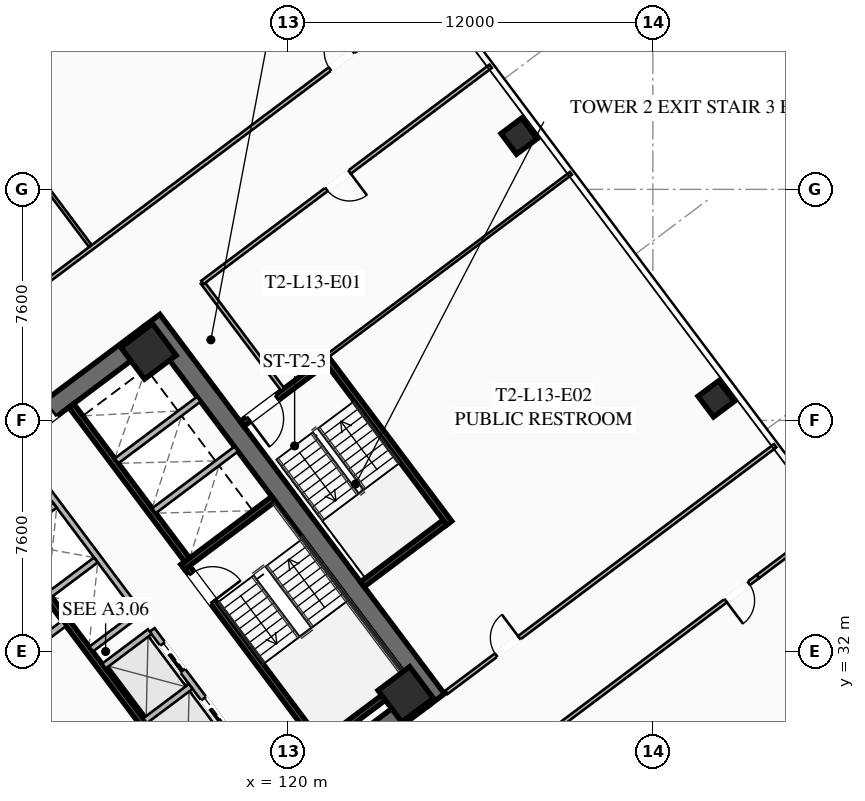
"""IFC4 building model, lengths in metres.
Left out: names, types, materials, properties, quantities, classifications, styles, units other than length and angle.
Written with IfcOpenShell. Run it as: python <this file> out.ifc"""

import sys

from ifc_helpers import new_model, si_unit, direction, frame, frame_2d, origin, origin_2d, place, context, subcontext, project, spatial, rectangle, hollow_rectangle, extrude, element, fill, save


model = new_model("IFC4")
c1 = context("Model", 3, precision=1e-05, world=origin(), true_north=direction((0.0, 1.0)))
c2 = subcontext(c1, "Body", "Model", "MODEL_VIEW")
j1 = project(units=[si_unit("LENGTHUNIT", "METRE"), si_unit("PLANEANGLEUNIT", "RADIAN")], contexts=[c1])
p1 = place(None, origin())
s1 = spatial("IfcSite", under=j1, at=p1, CompositionType="ELEMENT")
p2 = place(p1, origin())
s2 = spatial("IfcBuilding", under=s1, at=p2, CompositionType="ELEMENT")
p3 = place(p2, frame((0.0, 0.0, 53.0)))
s3 = spatial("IfcBuildingStorey", under=s2, at=p3, CompositionType="ELEMENT", Elevation=53.0)
for number, where, z_axis, x_axis in (
    (1, (112.476, 21.107, 0.0), (0.0, 0.0, 1.0), (-0.6, 0.8, 0.0)),
    (2, (115.524, 42.893, 0.0), (0.0, 0.0, 1.0), (0.6, -0.8, 0.0)),
):
    element("IfcWall", number, at=place(p3, frame(where, z_axis=z_axis, x_axis=x_axis)), inside=s3, PredefinedType="SHEAR", context=c2, shape_type="SweptSolid", body=[
        extrude(rectangle(XDim=15.6, YDim=0.65, at=frame_2d((7.8, 0.0))), origin(), (0.0, 0.0, 1.0), 3.55),
    ])
p4 = place(p3, frame((124.429, 30.478, 0.0), z_axis=(0.0, 0.0, 1.0), x_axis=(-0.799998028465, -0.600002628705, 0.0)))
e3 = element("IfcWall", 3, at=p4, inside=s3, PredefinedType="SHEAR", context=c2, shape_type="SweptSolid", body=[
    extrude(rectangle(XDim=14.86, YDim=0.65, at=frame_2d((7.43, 0.0))), origin(), (0.0, 0.0, 1.0), 3.55),
])
p5 = place(p4, frame((9.13, 0.0, 0.0)))
e4 = element("IfcOpeningElement", 4, at=p5, cuts=e3, PredefinedType="OPENING", context=c2, shape_type="SweptSolid", body=[
    extrude(rectangle(XDim=1.25, YDim=2.25, at=frame_2d((0.625, 1.125))), frame((0.0, 0.335, 0.0), z_axis=(0.0, -1.0, 0.0), x_axis=(1.0, 0.0, 0.0)), (0.0, 0.0, 1.0), 0.67),
])
p6 = place(p4, frame((4.08, 0.0, 0.0)))
e5 = element("IfcOpeningElement", 5, at=p6, cuts=e3, PredefinedType="OPENING", context=c2, shape_type="SweptSolid", body=[
    extrude(rectangle(XDim=1.25, YDim=2.25, at=frame_2d((0.625, 1.125))), frame((0.0, 0.335, 0.0), z_axis=(0.0, -1.0, 0.0), x_axis=(1.0, 0.0, 0.0)), (0.0, 0.0, 1.0), 0.67),
])
p7 = place(p3, frame((103.571, 33.522, 0.0), z_axis=(0.0, 0.0, 1.0), x_axis=(0.799998028465, 0.600002628705, 0.0)))
e6 = element("IfcWall", 6, at=p7, inside=s3, PredefinedType="SHEAR", context=c2, shape_type="SweptSolid", body=[
    extrude(rectangle(XDim=14.86, YDim=0.65, at=frame_2d((7.43, 0.0))), origin(), (0.0, 0.0, 1.0), 3.55),
])
p8 = place(p7, frame((4.48, 0.0, 0.0)))
e7 = element("IfcOpeningElement", 7, at=p8, cuts=e6, PredefinedType="OPENING", context=c2, shape_type="SweptSolid", body=[
    extrude(rectangle(XDim=1.25, YDim=2.25, at=frame_2d((0.625, 1.125))), frame((0.0, 0.335, 0.0), z_axis=(0.0, -1.0, 0.0), x_axis=(1.0, 0.0, 0.0)), (0.0, 0.0, 1.0), 0.67),
])
p9 = place(p7, frame((9.53, 0.0, 0.0)))
e8 = element("IfcOpeningElement", 8, at=p9, cuts=e6, PredefinedType="OPENING", context=c2, shape_type="SweptSolid", body=[
    extrude(rectangle(XDim=1.25, YDim=2.25, at=frame_2d((0.625, 1.125))), frame((0.0, 0.335, 0.0), z_axis=(0.0, -1.0, 0.0), x_axis=(1.0, 0.0, 0.0)), (0.0, 0.0, 1.0), 0.67),
])
for number, where, z_axis, x_axis in (
    (9, (123.87, 30.59, 0.0), (0.0, 0.0, 1.0), (0.8, 0.6, 0.0)),
    (10, (115.41, 41.87, 0.0), (0.0, 0.0, 1.0), (0.8, 0.6, 0.0)),
):
    element("IfcColumn", number, at=place(p3, frame(where, z_axis=z_axis, x_axis=x_axis)), inside=s3, PredefinedType="COLUMN", context=c2, shape_type="SweptSolid", body=[
        extrude(hollow_rectangle(XDim=1.3, YDim=1.3, WallThickness=0.05, at=origin_2d()), origin(), (0.0, 0.0, 1.0), 3.35),
    ])
for number, where, z_axis, x_axis in (
    (11, (134.08, 40.31, 0.0), (0.0, 0.0, 1.0), (0.8, 0.6, 0.0)),
    (12, (127.6, 48.95, 0.0), (0.0, 0.0, 1.0), (0.8, 0.6, 0.0)),
):
    element("IfcColumn", number, at=place(p3, frame(where, z_axis=z_axis, x_axis=x_axis)), inside=s3, PredefinedType="COLUMN", context=c2, shape_type="SweptSolid", body=[
        extrude(hollow_rectangle(XDim=0.85, YDim=0.85, WallThickness=0.035, at=origin_2d()), origin(), (0.0, 0.0, 1.0), 3.35),
    ])
p10 = place(p3, frame((116.56, 34.92, 0.0), z_axis=(0.0, 0.0, 1.0), x_axis=(0.600009827119, -0.799992629566, 0.0)))
e13 = element("IfcWall", 13, at=p10, inside=s3, PredefinedType="SHEAR", context=c2, shape_type="SweptSolid", body=[
    extrude(rectangle(XDim=7.95, YDim=0.2, at=frame_2d((3.975, 0.0))), origin(), (0.0, 0.0, 1.0), 3.35),
])
p11 = place(p10, frame((0.45, 0.0, 0.0)))
e14 = element("IfcOpeningElement", 14, at=p11, cuts=e13, PredefinedType="OPENING", context=c2, shape_type="SweptSolid", body=[
    extrude(rectangle(XDim=1.15, YDim=2.2, at=frame_2d((0.575, 1.1))), frame((0.0, 0.11, 0.0), z_axis=(0.0, -1.0, 0.0), x_axis=(1.0, 0.0, 0.0)), (0.0, 0.0, 1.0), 0.22),
])
for number, where, z_axis, x_axis in (
    (15, (116.54, 34.78, 0.0), (0.0, 0.0, 1.0), (0.8, 0.6, 0.0)),
    (16, (120.98, 28.86, 0.0), (0.0, 0.0, 1.0), (0.8, 0.6, 0.0)),
):
    element("IfcWall", number, at=place(p3, frame(where, z_axis=z_axis, x_axis=x_axis)), inside=s3, PredefinedType="SHEAR", context=c2, shape_type="SweptSolid", body=[
        extrude(rectangle(XDim=3.73, YDim=0.2, at=frame_2d((1.865, 0.0))), origin(), (0.0, 0.0, 1.0), 3.35),
    ])
p12 = place(p3, frame((117.938, 26.016, 0.0), z_axis=(0.0, 0.0, 1.0), x_axis=(-0.600005463273, 0.799995902516, 0.0)))
e17 = element("IfcWall", 17, at=p12, inside=s3, PredefinedType="SHEAR", context=c2, shape_type="SweptSolid", body=[
    extrude(rectangle(XDim=14.3, YDim=0.2, at=frame_2d((7.15, 0.0))), origin(), (0.0, 0.0, 1.0), 3.35),
])
p13 = place(p3, frame((110.104, 31.028, 0.0), z_axis=(0.0, 0.0, 1.0), x_axis=(0.800018601094, 0.59997519774, 0.0)))
e18 = element("IfcWall", 18, at=p13, inside=s3, PredefinedType="SOLIDWALL", context=c2, shape_type="SweptSolid", body=[
    extrude(rectangle(XDim=3.15, YDim=0.22, at=frame_2d((1.575, 0.0))), origin(), (0.0, 0.0, 1.0), 2.703),
])
p14 = place(p3, frame((112.87, 40.09, 0.0), z_axis=(0.0, 0.0, 1.0), x_axis=(0.599975393228, -0.800018454488, 0.0)))
e19 = element("IfcWall", 19, at=p14, inside=s3, PredefinedType="SHEAR", context=c2, shape_type="SweptSolid", body=[
    extrude(rectangle(XDim=6.35, YDim=0.2, at=frame_2d((3.175, 0.0))), origin(), (0.0, 0.0, 1.0), 3.35),
])
for number, where, z_axis, x_axis in (
    (20, (115.59, 36.63, 0.0), (0.0, 0.0, 1.0), (0.8, 0.6, 0.0)),
    (21, (114.36, 38.27, 0.0), (0.0, 0.0, 1.0), (0.8, 0.6, 0.0)),
):
    element("IfcWall", number, at=place(p3, frame(where, z_axis=z_axis, x_axis=x_axis)), inside=s3, PredefinedType="SOLIDWALL", context=c2, shape_type="SweptSolid", body=[
        extrude(rectangle(XDim=3.38, YDim=0.2, at=frame_2d((1.69, 0.0))), origin(), (0.0, 0.0, 1.0), 3.35),
    ])
p15 = place(p3, frame((119.61, 27.27, 0.0), z_axis=(0.0, 0.0, 1.0), x_axis=(-0.600011488909, 0.79999138319, 0.0)))
e22 = element("IfcWall", 22, at=p15, inside=s3, PredefinedType="SOLIDWALL", context=c2, shape_type="SweptSolid", body=[
    extrude(rectangle(XDim=6.8, YDim=0.2, at=frame_2d((3.4, 0.0))), origin(), (0.0, 0.0, 1.0), 3.35),
])
p16 = place(p15, frame((0.625, 0.0, 0.0)))
e23 = element("IfcOpeningElement", 23, at=p16, cuts=e22, PredefinedType="OPENING", context=c2, shape_type="SweptSolid", body=[
    extrude(rectangle(XDim=1.1, YDim=2.2, at=frame_2d((0.55, 1.1))), frame((0.0, 0.11, 0.0), z_axis=(0.0, -1.0, 0.0), x_axis=(1.0, 0.0, 0.0)), (0.0, 0.0, 1.0), 0.22),
])
p17 = place(p15, frame((2.875, 0.0, 0.0)))
e24 = element("IfcOpeningElement", 24, at=p17, cuts=e22, PredefinedType="OPENING", context=c2, shape_type="SweptSolid", body=[
    extrude(rectangle(XDim=1.1, YDim=2.2, at=frame_2d((0.55, 1.1))), frame((0.0, 0.11, 0.0), z_axis=(0.0, -1.0, 0.0), x_axis=(1.0, 0.0, 0.0)), (0.0, 0.0, 1.0), 0.22),
])
p18 = place(p15, frame((5.125, 0.0, 0.0)))
e25 = element("IfcOpeningElement", 25, at=p18, cuts=e22, PredefinedType="OPENING", context=c2, shape_type="SweptSolid", body=[
    extrude(rectangle(XDim=1.1, YDim=2.2, at=frame_2d((0.55, 1.1))), frame((0.0, 0.11, 0.0), z_axis=(0.0, -1.0, 0.0), x_axis=(1.0, 0.0, 0.0)), (0.0, 0.0, 1.0), 0.22),
])
p19 = place(p3, frame((115.296, 29.722, 0.0), z_axis=(0.0, 0.0, 1.0), x_axis=(0.799984418148, 0.600020775241, 0.0)))
e26 = element("IfcWall", 26, at=p19, inside=s3, PredefinedType="SOLIDWALL", context=c2, shape_type="SweptSolid", body=[
    extrude(rectangle(XDim=1.88, YDim=0.2, at=frame_2d((0.94, 0.0))), origin(), (0.0, 0.0, 1.0), 3.35),
])
p20 = place(p3, frame((113.946, 31.522, 0.0), z_axis=(0.0, 0.0, 1.0), x_axis=(0.8, 0.6, 0.0)))
e27 = element("IfcWall", 27, at=p20, inside=s3, PredefinedType="SOLIDWALL", context=c2, shape_type="SweptSolid", body=[
    extrude(rectangle(XDim=1.88, YDim=0.2, at=frame_2d((0.94, 0.0))), origin(), (0.0, 0.0, 1.0), 3.35),
])
p21 = place(p3, frame((115.11, 33.27, 0.0), z_axis=(0.0, 0.0, 1.0), x_axis=(-0.600011488909, 0.79999138319, 0.0)))
e28 = element("IfcWall", 28, at=p21, inside=s3, PredefinedType="SOLIDWALL", context=c2, shape_type="SweptSolid", body=[
    extrude(rectangle(XDim=6.8, YDim=0.2, at=frame_2d((3.4, 0.0))), origin(), (0.0, 0.0, 1.0), 3.35),
])
p22 = place(p3, frame((113.526, 32.082, 0.0), z_axis=(0.0, 0.0, 1.0), x_axis=(0.800046745961, 0.599937666993, 0.0)))
e29 = element("IfcWall", 29, at=p22, inside=s3, PredefinedType="SOLIDWALL", context=c2, shape_type="SweptSolid", body=[
    extrude(rectangle(XDim=1.88, YDim=0.2, at=frame_2d((0.94, 0.0))), origin(), (0.0, 0.0, 1.0), 3.35),
])
p23 = place(p3, frame((112.176, 33.882, 0.0), z_axis=(0.0, 0.0, 1.0), x_axis=(0.8, 0.6, 0.0)))
e30 = element("IfcWall", 30, at=p23, inside=s3, PredefinedType="SOLIDWALL", context=c2, shape_type="SweptSolid", body=[
    extrude(rectangle(XDim=1.88, YDim=0.2, at=frame_2d((0.94, 0.0))), origin(), (0.0, 0.0, 1.0), 3.35),
])
p24 = place(p3, frame((110.826, 35.682, 0.0), z_axis=(0.0, 0.0, 1.0), x_axis=(0.799984418148, 0.600020775241, 0.0)))
e31 = element("IfcWall", 31, at=p24, inside=s3, PredefinedType="SOLIDWALL", context=c2, shape_type="SweptSolid", body=[
    extrude(rectangle(XDim=1.88, YDim=0.2, at=frame_2d((0.94, 0.0))), origin(), (0.0, 0.0, 1.0), 3.35),
])
p25 = place(p3, frame((125.304, 36.228, 0.0), z_axis=(0.0, 0.0, 1.0), x_axis=(-0.59998851072, 0.800008616831, 0.0)))
e32 = element("IfcWall", 32, at=p25, inside=s3, PredefinedType="SHEAR", context=c2, shape_type="SweptSolid", body=[
    extrude(rectangle(XDim=6.8, YDim=0.2, at=frame_2d((3.4, 0.0))), origin(), (0.0, 0.0, 1.0), 3.35),
])
p26 = place(p3, frame((121.204, 41.528, 0.0), z_axis=(0.0, 0.0, 1.0), x_axis=(-0.800017232136, -0.599977023131, 0.0)))
e33 = element("IfcWall", 33, at=p26, inside=s3, PredefinedType="SHEAR", context=c2, shape_type="SweptSolid", body=[
    extrude(rectangle(XDim=3.4, YDim=0.2, at=frame_2d((1.7, 0.0))), origin(), (0.0, 0.0, 1.0), 3.35),
])
p27 = place(p26, frame((1.975, 0.0, 0.0)))
e34 = element("IfcOpeningElement", 34, at=p27, cuts=e33, PredefinedType="OPENING", context=c2, shape_type="SweptSolid", body=[
    extrude(rectangle(XDim=1.15, YDim=2.2, at=frame_2d((0.575, 1.1))), frame((0.0, 0.11, 0.0), z_axis=(0.0, -1.0, 0.0), x_axis=(1.0, 0.0, 0.0)), (0.0, 0.0, 1.0), 0.22),
])
p28 = place(p3, frame((122.444, 34.208, 0.0), z_axis=(0.0, 0.0, 1.0), x_axis=(0.79999138319, 0.600011488909, 0.0)))
e35 = element("IfcWall", 35, at=p28, inside=s3, PredefinedType="SHEAR", context=c2, shape_type="SweptSolid", body=[
    extrude(rectangle(XDim=3.4, YDim=0.2, at=frame_2d((1.7, 0.0))), origin(), (0.0, 0.0, 1.0), 3.35),
])
p29 = place(p3, frame((119.824, 40.618, 0.0), z_axis=(0.0, 0.0, 1.0), x_axis=(-0.599982243973, 0.800013316712, 0.0)))
e36 = element("IfcWall", 36, at=p29, inside=s3, PredefinedType="PARTITIONING", context=c2, shape_type="SweptSolid", body=[
    extrude(rectangle(XDim=4.4, YDim=0.135, at=frame_2d((2.2, 0.0))), origin(), (0.0, 0.0, 1.0), 2.703),
])
p30 = place(p3, frame((98.276, 33.832, 0.0), z_axis=(0.0, 0.0, 1.0), x_axis=(0.800001944698, 0.59999740706, 0.0)))
e37 = element("IfcWall", 37, at=p30, inside=s3, PredefinedType="PARTITIONING", context=c2, shape_type="SweptSolid", body=[
    extrude(rectangle(XDim=30.13, YDim=0.135, at=frame_2d((15.065, 0.0))), origin(), (0.0, 0.0, 1.0), 2.703),
])
p31 = place(p30, frame((0.3, 0.0, 0.0)))
e38 = element("IfcOpeningElement", 38, at=p31, cuts=e37, PredefinedType="OPENING", context=c2, shape_type="SweptSolid", body=[
    extrude(rectangle(XDim=0.95, YDim=2.05, at=frame_2d((0.475, 1.025))), frame((0.0, 0.077, 0.0), z_axis=(0.0, -1.0, 0.0), x_axis=(1.0, 0.0, 0.0)), (0.0, 0.0, 1.0), 0.155),
])
p32 = place(p30, frame((10.95, 0.0, 0.0)))
e39 = element("IfcOpeningElement", 39, at=p32, cuts=e37, PredefinedType="OPENING", context=c2, shape_type="SweptSolid", body=[
    extrude(rectangle(XDim=0.95, YDim=2.05, at=frame_2d((0.475, 1.025))), frame((0.0, 0.077, 0.0), z_axis=(0.0, -1.0, 0.0), x_axis=(1.0, 0.0, 0.0)), (0.0, 0.0, 1.0), 0.155),
])
p33 = place(p30, frame((14.95, 0.0, 0.0)))
e40 = element("IfcOpeningElement", 40, at=p33, cuts=e37, PredefinedType="OPENING", context=c2, shape_type="SweptSolid", body=[
    extrude(rectangle(XDim=0.95, YDim=2.05, at=frame_2d((0.475, 1.025))), frame((0.0, 0.077, 0.0), z_axis=(0.0, -1.0, 0.0), x_axis=(1.0, 0.0, 0.0)), (0.0, 0.0, 1.0), 0.155),
])
p34 = place(p30, frame((28.88, 0.0, 0.0)))
e41 = element("IfcOpeningElement", 41, at=p34, cuts=e37, PredefinedType="OPENING", context=c2, shape_type="SweptSolid", body=[
    extrude(rectangle(XDim=0.95, YDim=2.05, at=frame_2d((0.475, 1.025))), frame((0.0, 0.077, 0.0), z_axis=(0.0, -1.0, 0.0), x_axis=(1.0, 0.0, 0.0)), (0.0, 0.0, 1.0), 0.155),
])
p35 = place(p3, frame((113.492, 45.344, 0.0), z_axis=(0.0, 0.0, 1.0), x_axis=(-0.599992698573, 0.800005476018, 0.0)))
e42 = element("IfcWall", 42, at=p35, inside=s3, PredefinedType="PARTITIONING", context=c2, shape_type="SweptSolid", body=[
    extrude(rectangle(XDim=10.7, YDim=0.11, at=frame_2d((5.35, 0.0))), origin(), (0.0, 0.0, 1.0), 2.703),
])
p36 = place(p3, frame((135.46, 34.47, 0.0), z_axis=(0.0, 0.0, 1.0), x_axis=(-0.800001944698, -0.59999740706, 0.0)))
e43 = element("IfcWall", 43, at=p36, inside=s3, PredefinedType="PARTITIONING", context=c2, shape_type="SweptSolid", body=[
    extrude(rectangle(XDim=30.13, YDim=0.135, at=frame_2d((15.065, 0.0))), origin(), (0.0, 0.0, 1.0), 2.703),
])
p37 = place(p36, frame((28.8, 0.0, 0.0)))
e44 = element("IfcOpeningElement", 44, at=p37, cuts=e43, PredefinedType="OPENING", context=c2, shape_type="SweptSolid", body=[
    extrude(rectangle(XDim=0.95, YDim=2.05, at=frame_2d((0.475, 1.025))), frame((0.0, 0.077, 0.0), z_axis=(0.0, -1.0, 0.0), x_axis=(1.0, 0.0, 0.0)), (0.0, 0.0, 1.0), 0.155),
])
p38 = place(p36, frame((17.921, 0.0, 0.0)))
e45 = element("IfcOpeningElement", 45, at=p38, cuts=e43, PredefinedType="OPENING", context=c2, shape_type="SweptSolid", body=[
    extrude(rectangle(XDim=0.95, YDim=2.05, at=frame_2d((0.475, 1.025))), frame((0.0, 0.077, 0.0), z_axis=(0.0, -1.0, 0.0), x_axis=(1.0, 0.0, 0.0)), (0.0, 0.0, 1.0), 0.155),
])
p39 = place(p36, frame((14.129, 0.0, 0.0)))
e46 = element("IfcOpeningElement", 46, at=p39, cuts=e43, PredefinedType="OPENING", context=c2, shape_type="SweptSolid", body=[
    extrude(rectangle(XDim=0.95, YDim=2.05, at=frame_2d((0.475, 1.025))), frame((0.0, 0.077, 0.0), z_axis=(0.0, -1.0, 0.0), x_axis=(1.0, 0.0, 0.0)), (0.0, 0.0, 1.0), 0.155),
])
p40 = place(p36, frame((0.38, 0.0, 0.0)))
e47 = element("IfcOpeningElement", 47, at=p40, cuts=e43, PredefinedType="OPENING", context=c2, shape_type="SweptSolid", body=[
    extrude(rectangle(XDim=0.95, YDim=2.05, at=frame_2d((0.475, 1.025))), frame((0.0, 0.077, 0.0), z_axis=(0.0, -1.0, 0.0), x_axis=(1.0, 0.0, 0.0)), (0.0, 0.0, 1.0), 0.155),
])
p41 = place(p3, frame((135.46, 34.47, 0.0), z_axis=(0.0, 0.0, 1.0), x_axis=(0.799990331366, 0.600012891296, 0.0)))
e48 = element("IfcWall", 48, at=p41, inside=s3, PredefinedType="PARTITIONING", context=c2, shape_type="SweptSolid", body=[
    extrude(rectangle(XDim=3.03, YDim=0.135, at=frame_2d((1.515, 0.0))), origin(), (0.0, 0.0, 1.0), 2.703),
])
p42 = place(p3, frame((126.664, 51.248, 0.0), z_axis=(0.0, 0.0, 1.0), x_axis=(-0.799995055373, -0.600006592779, 0.0)))
e49 = element("IfcWall", 49, at=p42, inside=s3, PredefinedType="PARTITIONING", context=c2, shape_type="SweptSolid", body=[
    extrude(rectangle(XDim=11.85, YDim=0.135, at=frame_2d((5.925, 0.0))), origin(), (0.0, 0.0, 1.0), 2.703),
])
p43 = place(p42, frame((5.8, 0.0, 0.0)))
e50 = element("IfcOpeningElement", 50, at=p43, cuts=e49, PredefinedType="OPENING", context=c2, shape_type="SweptSolid", body=[
    extrude(rectangle(XDim=0.95, YDim=2.05, at=frame_2d((0.475, 1.025))), frame((0.0, 0.077, 0.0), z_axis=(0.0, -1.0, 0.0), x_axis=(1.0, 0.0, 0.0)), (0.0, 0.0, 1.0), 0.155),
])
p44 = place(p3, frame((125.208, 30.656, 0.0), z_axis=(0.0, 0.0, 1.0), x_axis=(0.799995666112, 0.600005778473, 0.0)))
e51 = element("IfcWall", 51, at=p44, inside=s3, PredefinedType="PARTITIONING", context=c2, shape_type="SweptSolid", body=[
    extrude(rectangle(XDim=13.52, YDim=0.135, at=frame_2d((6.76, 0.0))), origin(), (0.0, 0.0, 1.0), 2.703),
])
p45 = place(p44, frame((2.045, 0.0, 0.0)))
e52 = element("IfcOpeningElement", 52, at=p45, cuts=e51, PredefinedType="OPENING", context=c2, shape_type="SweptSolid", body=[
    extrude(rectangle(XDim=0.95, YDim=2.05, at=frame_2d((0.475, 1.025))), frame((0.0, 0.077, 0.0), z_axis=(0.0, -1.0, 0.0), x_axis=(1.0, 0.0, 0.0)), (0.0, 0.0, 1.0), 0.155),
])
p46 = place(p3, frame((129.304, 47.728, 0.0), z_axis=(0.0, 0.0, 1.0), x_axis=(-0.8, -0.6, 0.0)))
e53 = element("IfcWall", 53, at=p46, inside=s3, PredefinedType="PARTITIONING", context=c2, shape_type="SweptSolid", body=[
    extrude(rectangle(XDim=10.0, YDim=0.11, at=frame_2d((5.0, 0.0))), origin(), (0.0, 0.0, 1.0), 2.703),
])
p47 = place(p11, origin())
e54 = element("IfcDoor", 54, at=p47, inside=s3, OperationType="SINGLE_SWING_RIGHT", PredefinedType="DOOR", context=c2, shape_type="SweptSolid", body=[
    extrude(rectangle(XDim=1.15, YDim=2.2, at=frame_2d((0.575, 1.1))), frame((0.0, 0.025, 0.0), z_axis=(0.0, -1.0, 0.0), x_axis=(1.0, 0.0, 0.0)), (0.0, 0.0, 1.0), 0.05),
])
fill(e14, e54)
p48 = place(p27, origin())
e55 = element("IfcDoor", 55, at=p48, inside=s3, OperationType="SINGLE_SWING_RIGHT", PredefinedType="DOOR", context=c2, shape_type="SweptSolid", body=[
    extrude(rectangle(XDim=1.15, YDim=2.2, at=frame_2d((0.575, 1.1))), frame((0.0, 0.025, 0.0), z_axis=(0.0, -1.0, 0.0), x_axis=(1.0, 0.0, 0.0)), (0.0, 0.0, 1.0), 0.05),
])
fill(e34, e55)
p49 = place(p34, origin())
e56 = element("IfcDoor", 56, at=p49, inside=s3, OperationType="SINGLE_SWING_RIGHT", PredefinedType="DOOR", context=c2, shape_type="SweptSolid", body=[
    extrude(rectangle(XDim=0.95, YDim=2.05, at=frame_2d((0.475, 1.025))), frame((0.0, 0.025, 0.0), z_axis=(0.0, -1.0, 0.0), x_axis=(1.0, 0.0, 0.0)), (0.0, 0.0, 1.0), 0.05),
])
fill(e41, e56)
p50 = place(p40, origin())
e57 = element("IfcDoor", 57, at=p50, inside=s3, OperationType="SINGLE_SWING_RIGHT", PredefinedType="DOOR", context=c2, shape_type="SweptSolid", body=[
    extrude(rectangle(XDim=0.95, YDim=2.05, at=frame_2d((0.475, 1.025))), frame((0.0, 0.025, 0.0), z_axis=(0.0, -1.0, 0.0), x_axis=(1.0, 0.0, 0.0)), (0.0, 0.0, 1.0), 0.05),
])
fill(e47, e57)
p51 = place(p43, origin())
e58 = element("IfcDoor", 58, at=p51, inside=s3, OperationType="SINGLE_SWING_LEFT", PredefinedType="DOOR", context=c2, shape_type="SweptSolid", body=[
    extrude(rectangle(XDim=0.95, YDim=2.05, at=frame_2d((0.475, 1.025))), frame((0.0, 0.025, 0.0), z_axis=(0.0, -1.0, 0.0), x_axis=(1.0, 0.0, 0.0)), (0.0, 0.0, 1.0), 0.05),
])
fill(e50, e58)
p52 = place(p45, origin())
e59 = element("IfcDoor", 59, at=p52, inside=s3, OperationType="SINGLE_SWING_RIGHT", PredefinedType="DOOR", context=c2, shape_type="SweptSolid", body=[
    extrude(rectangle(XDim=0.95, YDim=2.05, at=frame_2d((0.475, 1.025))), frame((0.0, 0.025, 0.0), z_axis=(0.0, -1.0, 0.0), x_axis=(1.0, 0.0, 0.0)), (0.0, 0.0, 1.0), 0.05),
])
fill(e52, e59)
p53 = place(p17, origin())
e60 = element("IfcDoor", 60, at=p53, inside=s3, OperationType="SLIDING_TO_LEFT", PredefinedType="DOOR", context=c2, shape_type="SweptSolid", body=[
    extrude(rectangle(XDim=1.1, YDim=2.2, at=frame_2d((0.55, 1.1))), frame((0.0, 0.025, 0.0), z_axis=(0.0, -1.0, 0.0), x_axis=(1.0, 0.0, 0.0)), (0.0, 0.0, 1.0), 0.05),
])
fill(e24, e60)
p54 = place(p18, origin())
e61 = element("IfcDoor", 61, at=p54, inside=s3, OperationType="SLIDING_TO_LEFT", PredefinedType="DOOR", context=c2, shape_type="SweptSolid", body=[
    extrude(rectangle(XDim=1.1, YDim=2.2, at=frame_2d((0.55, 1.1))), frame((0.0, 0.025, 0.0), z_axis=(0.0, -1.0, 0.0), x_axis=(1.0, 0.0, 0.0)), (0.0, 0.0, 1.0), 0.05),
])
fill(e25, e61)
save(model, sys.argv[1])
